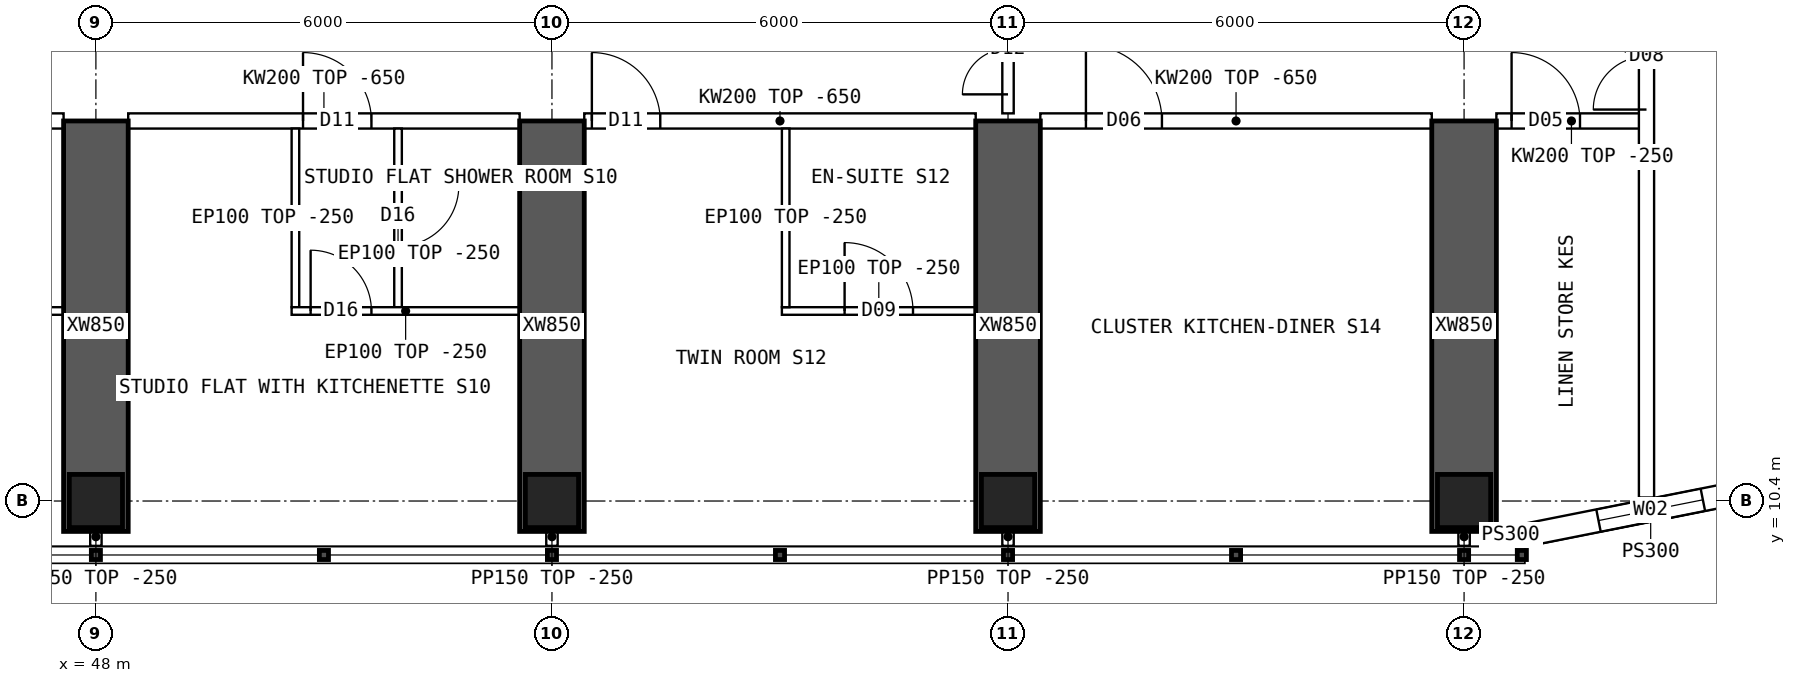
"""IFC4 building model, lengths in metres.
Left out: names, types, materials, properties, quantities, classifications, styles, units other than length and angle.
Written with IfcOpenShell. Run it as: python <this file> out.ifc"""

import sys

from ifc_helpers import new_model, si_unit, direction, frame, frame_2d, origin, origin_2d, place, context, subcontext, project, spatial, polyline, rectangle, hollow_rectangle, outline, extrude, element, fill, save


model = new_model("IFC4")
c1 = context("Model", 3, precision=1e-05, world=origin(), true_north=direction((0.0, 1.0)))
c2 = subcontext(c1, "Body", "Model", "MODEL_VIEW")
j1 = project(units=[si_unit("LENGTHUNIT", "METRE"), si_unit("PLANEANGLEUNIT", "RADIAN")], contexts=[c1])
p1 = place(None, origin())
s1 = spatial("IfcSite", under=j1, at=p1, CompositionType="ELEMENT")
p2 = place(p1, origin())
s2 = spatial("IfcBuilding", under=s1, at=p2, CompositionType="ELEMENT")
p3 = place(p2, frame((0.0, 0.0, 152.35)))
s3 = spatial("IfcBuildingStorey", under=s2, at=p3, CompositionType="ELEMENT", Elevation=152.35)
for number, where, z_axis, x_axis in (
    (1, (48.0, 10.4, 0.0), (0.0, 0.0, 1.0), (1.0, 0.0, 0.0)),
    (2, (54.0, 10.4, 0.0), (0.0, 0.0, 1.0), (1.0, 0.0, 0.0)),
    (3, (60.0, 10.4, 0.0), (0.0, 0.0, 1.0), (1.0, 0.0, 0.0)),
    (4, (66.0, 10.4, 0.0), (0.0, 0.0, 1.0), (1.0, 0.0, 0.0)),
):
    element("IfcColumn", number, at=place(p3, frame(where, z_axis=z_axis, x_axis=x_axis)), inside=s3, PredefinedType="COLUMN", context=c2, shape_type="SweptSolid", body=[
        extrude(hollow_rectangle(XDim=0.7, YDim=0.7, WallThickness=0.07, at=origin_2d()), origin(), (0.0, 0.0, 1.0), 3.75),
    ])
for number, where, z_axis, x_axis in (
    (5, (48.0, 10.0, 0.0), (0.0, 0.0, 1.0), (0.0, 1.0, 0.0)),
    (6, (54.0, 10.0, 0.0), (0.0, 0.0, 1.0), (0.0, 1.0, 0.0)),
    (7, (60.0, 10.0, 0.0), (0.0, 0.0, 1.0), (0.0, 1.0, 0.0)),
    (8, (66.0, 10.0, 0.0), (0.0, 0.0, 1.0), (0.0, 1.0, 0.0)),
):
    element("IfcWall", number, at=place(p3, frame(where, z_axis=z_axis, x_axis=x_axis)), inside=s3, PredefinedType="SHEAR", context=c2, shape_type="SweptSolid", body=[
        extrude(rectangle(XDim=5.4, YDim=0.85, at=frame_2d((2.7, 0.0))), origin(), (0.0, 0.0, 1.0), 3.75),
    ])
p4 = place(p3, frame((66.8, 9.95, 0.0), z_axis=(0.0, 0.0, 1.0), x_axis=(0.98078325777, 0.195100490205, 0.0)))
e9 = element("IfcWall", 9, at=p4, inside=s3, PredefinedType="SOLIDWALL", context=c2, shape_type="SweptSolid", body=[
    extrude(outline(polyline([(-0.03, -0.15), (3.405, -0.15), (3.345, 0.15), (0.03, 0.15), (-0.03, -0.15)])), origin(), (0.0, 0.0, 1.0), 3.5),
])
p5 = place(p4, frame((0.988, 0.0, 0.9)))
e10 = element("IfcOpeningElement", 10, at=p5, cuts=e9, PredefinedType="OPENING", context=c2, shape_type="SweptSolid", body=[
    extrude(rectangle(XDim=1.4, YDim=1.8, at=frame_2d((0.7, 0.9))), frame((0.0, 0.16, 0.0), z_axis=(0.0, -1.0, 0.0), x_axis=(1.0, 0.0, 0.0)), (0.0, 0.0, 1.0), 0.32),
])
p6 = place(p3, frame((66.8, 9.95, 0.0), z_axis=(0.0, 0.0, 1.0), x_axis=(-1.0, 0.0, 0.0)))
e11 = element("IfcWall", 11, at=p6, inside=s3, PredefinedType="SOLIDWALL", context=c2, shape_type="SweptSolid", body=[
    extrude(rectangle(XDim=0.375, YDim=0.3, at=frame_2d((0.188, 0.0))), origin(), (0.0, 0.0, 1.0), 3.5),
])
p7 = place(p3, frame((42.425, 15.4, 0.0), z_axis=(0.0, 0.0, 1.0), x_axis=(1.0, 0.0, 0.0)))
e12 = element("IfcWall", 12, at=p7, inside=s3, PredefinedType="SOLIDWALL", context=c2, shape_type="SweptSolid", body=[
    extrude(outline(polyline([(0.0, 0.0), (5.15, 0.0), (5.15, 3.1), (0.0, 3.1), (0.0, 0.0)])), frame((0.0, 0.1, 0.0), z_axis=(0.0, -1.0, 0.0), x_axis=(1.0, 0.0, 0.0)), (0.0, 0.0, 1.0), 0.2),
])
p8 = place(p7, frame((0.1, 0.0, 0.0)))
e13 = element("IfcOpeningElement", 13, at=p8, cuts=e12, PredefinedType="OPENING", context=c2, shape_type="SweptSolid", body=[
    extrude(rectangle(XDim=0.9, YDim=2.1, at=frame_2d((0.45, 1.05))), frame((0.0, 0.11, 0.0), z_axis=(0.0, -1.0, 0.0), x_axis=(1.0, 0.0, 0.0)), (0.0, 0.0, 1.0), 0.22),
])
p9 = place(p3, frame((48.425, 15.4, 0.0), z_axis=(0.0, 0.0, 1.0), x_axis=(1.0, 0.0, 0.0)))
e14 = element("IfcWall", 14, at=p9, inside=s3, PredefinedType="SOLIDWALL", context=c2, shape_type="SweptSolid", body=[
    extrude(outline(polyline([(0.0, 0.0), (5.15, 0.0), (5.15, 3.1), (0.0, 3.1), (0.0, 0.0)])), frame((0.0, 0.1, 0.0), z_axis=(0.0, -1.0, 0.0), x_axis=(1.0, 0.0, 0.0)), (0.0, 0.0, 1.0), 0.2),
])
p10 = place(p9, frame((2.3, 0.0, 0.0)))
e15 = element("IfcOpeningElement", 15, at=p10, cuts=e14, PredefinedType="OPENING", context=c2, shape_type="SweptSolid", body=[
    extrude(rectangle(XDim=0.9, YDim=2.1, at=frame_2d((0.45, 1.05))), frame((0.0, 0.11, 0.0), z_axis=(0.0, -1.0, 0.0), x_axis=(1.0, 0.0, 0.0)), (0.0, 0.0, 1.0), 0.22),
])
p11 = place(p3, frame((54.425, 15.4, 0.0), z_axis=(0.0, 0.0, 1.0), x_axis=(1.0, 0.0, 0.0)))
e16 = element("IfcWall", 16, at=p11, inside=s3, PredefinedType="SOLIDWALL", context=c2, shape_type="SweptSolid", body=[
    extrude(outline(polyline([(0.0, 0.0), (5.15, 0.0), (5.15, 3.1), (0.0, 3.1), (0.0, 0.0)])), frame((0.0, 0.1, 0.0), z_axis=(0.0, -1.0, 0.0), x_axis=(1.0, 0.0, 0.0)), (0.0, 0.0, 1.0), 0.2),
])
p12 = place(p11, frame((0.1, 0.0, 0.0)))
e17 = element("IfcOpeningElement", 17, at=p12, cuts=e16, PredefinedType="OPENING", context=c2, shape_type="SweptSolid", body=[
    extrude(rectangle(XDim=0.9, YDim=2.1, at=frame_2d((0.45, 1.05))), frame((0.0, 0.11, 0.0), z_axis=(0.0, -1.0, 0.0), x_axis=(1.0, 0.0, 0.0)), (0.0, 0.0, 1.0), 0.22),
])
p13 = place(p3, frame((60.425, 15.4, 0.0), z_axis=(0.0, 0.0, 1.0), x_axis=(1.0, 0.0, 0.0)))
e18 = element("IfcWall", 18, at=p13, inside=s3, PredefinedType="SOLIDWALL", context=c2, shape_type="SweptSolid", body=[
    extrude(outline(polyline([(0.0, 0.0), (5.15, 0.0), (5.15, 3.1), (0.0, 3.1), (0.0, 0.0)])), frame((0.0, 0.1, 0.0), z_axis=(0.0, -1.0, 0.0), x_axis=(1.0, 0.0, 0.0)), (0.0, 0.0, 1.0), 0.2),
])
p14 = place(p13, frame((0.6, 0.0, 0.0)))
e19 = element("IfcOpeningElement", 19, at=p14, cuts=e18, PredefinedType="OPENING", context=c2, shape_type="SweptSolid", body=[
    extrude(rectangle(XDim=1.0, YDim=2.1, at=frame_2d((0.5, 1.05))), frame((0.0, 0.11, 0.0), z_axis=(0.0, -1.0, 0.0), x_axis=(1.0, 0.0, 0.0)), (0.0, 0.0, 1.0), 0.22),
])
p15 = place(p3, frame((66.425, 15.4, 0.0), z_axis=(0.0, 0.0, 1.0), x_axis=(1.0, 0.0, 0.0)))
e20 = element("IfcWall", 20, at=p15, inside=s3, PredefinedType="SOLIDWALL", context=c2, shape_type="SweptSolid", body=[
    extrude(rectangle(XDim=1.975, YDim=0.2, at=frame_2d((0.987, 0.0))), origin(), (0.0, 0.0, 1.0), 3.5),
])
p16 = place(p15, frame((0.2, 0.0, 0.0)))
e21 = element("IfcOpeningElement", 21, at=p16, cuts=e20, PredefinedType="OPENING", context=c2, shape_type="SweptSolid", body=[
    extrude(rectangle(XDim=0.9, YDim=2.1, at=frame_2d((0.45, 1.05))), frame((0.0, 0.11, 0.0), z_axis=(0.0, -1.0, 0.0), x_axis=(1.0, 0.0, 0.0)), (0.0, 0.0, 1.0), 0.22),
])
p17 = place(p3, frame((47.575, 12.9, 0.0), z_axis=(0.0, 0.0, 1.0), x_axis=(-1.0, 0.0, 0.0)))
e22 = element("IfcWall", 22, at=p17, inside=s3, PredefinedType="PARTITIONING", context=c2, shape_type="SweptSolid", body=[
    extrude(rectangle(XDim=2.55, YDim=0.1, at=frame_2d((1.275, 0.0))), origin(), (0.0, 0.0, 1.0), 3.5),
])
p18 = place(p17, frame((0.825, 0.0, 0.0)))
e23 = element("IfcOpeningElement", 23, at=p18, cuts=e22, PredefinedType="OPENING", context=c2, shape_type="SweptSolid", body=[
    extrude(rectangle(XDim=0.9, YDim=2.1, at=frame_2d((0.45, 1.05))), frame((0.0, 0.06, 0.0), z_axis=(0.0, -1.0, 0.0), x_axis=(1.0, 0.0, 0.0)), (0.0, 0.0, 1.0), 0.12),
])
p19 = place(p3, frame((53.575, 12.9, 0.0), z_axis=(0.0, 0.0, 1.0), x_axis=(-1.0, 0.0, 0.0)))
e24 = element("IfcWall", 24, at=p19, inside=s3, PredefinedType="PARTITIONING", context=c2, shape_type="SweptSolid", body=[
    extrude(rectangle(XDim=3.0, YDim=0.1, at=frame_2d((1.5, 0.0))), origin(), (0.0, 0.0, 1.0), 3.5),
])
p20 = place(p19, frame((1.95, 0.0, 0.0)))
e25 = element("IfcOpeningElement", 25, at=p20, cuts=e24, PredefinedType="OPENING", context=c2, shape_type="SweptSolid", body=[
    extrude(rectangle(XDim=0.8, YDim=2.1, at=frame_2d((0.4, 1.05))), frame((0.0, 0.06, 0.0), z_axis=(0.0, -1.0, 0.0), x_axis=(1.0, 0.0, 0.0)), (0.0, 0.0, 1.0), 0.12),
])
p21 = place(p3, frame((50.625, 12.95, 0.0), z_axis=(0.0, 0.0, 1.0), x_axis=(0.0, 1.0, 0.0)))
e26 = element("IfcWall", 26, at=p21, inside=s3, PredefinedType="PARTITIONING", context=c2, shape_type="SweptSolid", body=[
    extrude(outline(polyline([(0.0, 0.0), (2.35, 0.0), (2.35, 3.1), (2.302, 3.1), (2.3, 3.5), (0.0, 3.5), (0.0, 0.0)])), frame((0.0, 0.05, 0.0), z_axis=(0.0, -1.0, 0.0), x_axis=(1.0, 0.0, 0.0)), (0.0, 0.0, 1.0), 0.1),
])
p22 = place(p3, frame((51.975, 12.95, 0.0), z_axis=(0.0, 0.0, 1.0), x_axis=(0.0, 1.0, 0.0)))
e27 = element("IfcWall", 27, at=p22, inside=s3, PredefinedType="PARTITIONING", context=c2, shape_type="SweptSolid", body=[
    extrude(outline(polyline([(0.0, 0.0), (2.35, 0.0), (2.35, 3.1), (2.302, 3.1), (2.3, 3.5), (0.0, 3.5), (0.0, 0.0)])), frame((0.0, 0.05, 0.0), z_axis=(0.0, -1.0, 0.0), x_axis=(1.0, 0.0, 0.0)), (0.0, 0.0, 1.0), 0.1),
])
p23 = place(p22, frame((0.8, 0.0, 0.0)))
e28 = element("IfcOpeningElement", 28, at=p23, cuts=e27, PredefinedType="OPENING", context=c2, shape_type="SweptSolid", body=[
    extrude(rectangle(XDim=0.8, YDim=2.1, at=frame_2d((0.4, 1.05))), frame((0.0, 0.06, 0.0), z_axis=(0.0, -1.0, 0.0), x_axis=(1.0, 0.0, 0.0)), (0.0, 0.0, 1.0), 0.12),
])
p24 = place(p3, frame((59.575, 12.9, 0.0), z_axis=(0.0, 0.0, 1.0), x_axis=(-1.0, 0.0, 0.0)))
e29 = element("IfcWall", 29, at=p24, inside=s3, PredefinedType="PARTITIONING", context=c2, shape_type="SweptSolid", body=[
    extrude(rectangle(XDim=2.55, YDim=0.1, at=frame_2d((1.275, 0.0))), origin(), (0.0, 0.0, 1.0), 3.5),
])
p25 = place(p24, frame((0.825, 0.0, 0.0)))
e30 = element("IfcOpeningElement", 30, at=p25, cuts=e29, PredefinedType="OPENING", context=c2, shape_type="SweptSolid", body=[
    extrude(rectangle(XDim=0.9, YDim=2.1, at=frame_2d((0.45, 1.05))), frame((0.0, 0.06, 0.0), z_axis=(0.0, -1.0, 0.0), x_axis=(1.0, 0.0, 0.0)), (0.0, 0.0, 1.0), 0.12),
])
p26 = place(p3, frame((57.075, 12.95, 0.0), z_axis=(0.0, 0.0, 1.0), x_axis=(0.0, 1.0, 0.0)))
e31 = element("IfcWall", 31, at=p26, inside=s3, PredefinedType="PARTITIONING", context=c2, shape_type="SweptSolid", body=[
    extrude(outline(polyline([(0.0, 0.0), (2.35, 0.0), (2.35, 3.1), (2.302, 3.1), (2.3, 3.5), (0.0, 3.5), (0.0, 0.0)])), frame((0.0, 0.05, 0.0), z_axis=(0.0, -1.0, 0.0), x_axis=(1.0, 0.0, 0.0)), (0.0, 0.0, 1.0), 0.1),
])
p27 = place(p3, frame((60.0, 15.5, 0.0), z_axis=(0.0, 0.0, 1.0), x_axis=(0.0, 1.0, 0.0)))
e32 = element("IfcWall", 32, at=p27, inside=s3, PredefinedType="PARTITIONING", context=c2, shape_type="SweptSolid", body=[
    extrude(outline(polyline([(0.0, 0.0), (1.7, 0.0), (1.7, 3.1), (0.0, 3.1), (0.0, 0.0)])), frame((0.0, 0.075, 0.0), z_axis=(0.0, -1.0, 0.0), x_axis=(1.0, 0.0, 0.0)), (0.0, 0.0, 1.0), 0.15),
])
p28 = place(p27, frame((0.25, 0.0, 0.0)))
e33 = element("IfcOpeningElement", 33, at=p28, cuts=e32, PredefinedType="OPENING", context=c2, shape_type="SweptSolid", body=[
    extrude(rectangle(XDim=1.2, YDim=2.1, at=frame_2d((0.6, 1.05))), frame((0.0, 0.085, 0.0), z_axis=(0.0, -1.0, 0.0), x_axis=(1.0, 0.0, 0.0)), (0.0, 0.0, 1.0), 0.17),
])
p29 = place(p3, frame((68.4, 10.446, 0.0), z_axis=(0.0, 0.0, 1.0), x_axis=(0.0, 1.0, 0.0)))
e34 = element("IfcWall", 34, at=p29, inside=s3, PredefinedType="SOLIDWALL", context=c2, shape_type="SweptSolid", body=[
    extrude(rectangle(XDim=43.107, YDim=0.2, at=frame_2d((21.554, 0.0))), origin(), (0.0, 0.0, 1.0), 3.5),
])
p30 = place(p29, frame((27.994, 0.0, 0.0)))
e35 = element("IfcOpeningElement", 35, at=p30, cuts=e34, PredefinedType="OPENING", context=c2, shape_type="SweptSolid", body=[
    extrude(rectangle(XDim=1.2, YDim=2.1, at=frame_2d((0.6, 1.05))), frame((0.0, 0.11, 0.0), z_axis=(0.0, -1.0, 0.0), x_axis=(1.0, 0.0, 0.0)), (0.0, 0.0, 1.0), 0.22),
])
p31 = place(p29, frame((5.104, 0.0, 0.0)))
e36 = element("IfcOpeningElement", 36, at=p31, cuts=e34, PredefinedType="OPENING", context=c2, shape_type="SweptSolid", body=[
    extrude(rectangle(XDim=1.4, YDim=2.1, at=frame_2d((0.7, 1.05))), frame((0.0, 0.11, 0.0), z_axis=(0.0, -1.0, 0.0), x_axis=(1.0, 0.0, 0.0)), (0.0, 0.0, 1.0), 0.22),
])
p32 = place(p29, frame((36.504, 0.0, 0.0)))
e37 = element("IfcOpeningElement", 37, at=p32, cuts=e34, PredefinedType="OPENING", context=c2, shape_type="SweptSolid", body=[
    extrude(rectangle(XDim=1.4, YDim=2.1, at=frame_2d((0.7, 1.05))), frame((0.0, 0.11, 0.0), z_axis=(0.0, -1.0, 0.0), x_axis=(1.0, 0.0, 0.0)), (0.0, 0.0, 1.0), 0.22),
])
for number, where, z_axis, x_axis in (
    (38, (48.0, 10.05, 0.0), (0.0, 0.0, 1.0), (0.0, -1.0, 0.0)),
    (39, (54.0, 10.05, 0.0), (0.0, 0.0, 1.0), (0.0, -1.0, 0.0)),
    (40, (60.0, 10.05, 0.0), (0.0, 0.0, 1.0), (0.0, -1.0, 0.0)),
    (41, (66.0, 10.05, 0.0), (0.0, 0.0, 1.0), (0.0, -1.0, 0.0)),
):
    element("IfcWall", number, at=place(p3, frame(where, z_axis=z_axis, x_axis=x_axis)), inside=s3, PredefinedType="PARTITIONING", context=c2, shape_type="SweptSolid", body=[
        extrude(rectangle(XDim=0.24, YDim=0.15, at=frame_2d((0.12, 0.0))), origin(), (0.0, 0.0, 1.0), 3.5),
    ])
p33 = place(p5, origin())
e42 = element("IfcWindow", 42, at=p33, inside=s3, PartitioningType="SINGLE_PANEL", PredefinedType="WINDOW", context=c2, shape_type="SweptSolid", body=[
    extrude(rectangle(XDim=1.4, YDim=1.8, at=frame_2d((0.7, 0.9))), frame((0.0, 0.03, 0.0), z_axis=(0.0, -1.0, 0.0), x_axis=(1.0, 0.0, 0.0)), (0.0, 0.0, 1.0), 0.06),
])
fill(e10, e42)
p34 = place(p20, origin())
e43 = element("IfcDoor", 43, at=p34, inside=s3, OperationType="SINGLE_SWING_RIGHT", PredefinedType="DOOR", context=c2, shape_type="SweptSolid", body=[
    extrude(rectangle(XDim=0.8, YDim=2.1, at=frame_2d((0.4, 1.05))), frame((0.0, 0.025, 0.0), z_axis=(0.0, -1.0, 0.0), x_axis=(1.0, 0.0, 0.0)), (0.0, 0.0, 1.0), 0.05),
])
fill(e25, e43)
p35 = place(p23, origin())
e44 = element("IfcDoor", 44, at=p35, inside=s3, OperationType="SINGLE_SWING_RIGHT", PredefinedType="DOOR", context=c2, shape_type="SweptSolid", body=[
    extrude(rectangle(XDim=0.8, YDim=2.1, at=frame_2d((0.4, 1.05))), frame((0.0, 0.025, 0.0), z_axis=(0.0, -1.0, 0.0), x_axis=(1.0, 0.0, 0.0)), (0.0, 0.0, 1.0), 0.05),
])
fill(e28, e44)
p36 = place(p10, origin())
e45 = element("IfcDoor", 45, at=p36, inside=s3, OperationType="SINGLE_SWING_LEFT", PredefinedType="DOOR", context=c2, shape_type="SweptSolid", body=[
    extrude(rectangle(XDim=0.9, YDim=2.1, at=frame_2d((0.45, 1.05))), frame((0.0, 0.025, 0.0), z_axis=(0.0, -1.0, 0.0), x_axis=(1.0, 0.0, 0.0)), (0.0, 0.0, 1.0), 0.05),
])
fill(e15, e45)
p37 = place(p25, origin())
e46 = element("IfcDoor", 46, at=p37, inside=s3, OperationType="SINGLE_SWING_RIGHT", PredefinedType="DOOR", context=c2, shape_type="SweptSolid", body=[
    extrude(rectangle(XDim=0.9, YDim=2.1, at=frame_2d((0.45, 1.05))), frame((0.0, 0.025, 0.0), z_axis=(0.0, -1.0, 0.0), x_axis=(1.0, 0.0, 0.0)), (0.0, 0.0, 1.0), 0.05),
])
fill(e30, e46)
p38 = place(p12, origin())
e47 = element("IfcDoor", 47, at=p38, inside=s3, OperationType="SINGLE_SWING_LEFT", PredefinedType="DOOR", context=c2, shape_type="SweptSolid", body=[
    extrude(rectangle(XDim=0.9, YDim=2.1, at=frame_2d((0.45, 1.05))), frame((0.0, 0.025, 0.0), z_axis=(0.0, -1.0, 0.0), x_axis=(1.0, 0.0, 0.0)), (0.0, 0.0, 1.0), 0.05),
])
fill(e17, e47)
p39 = place(p14, origin())
e48 = element("IfcDoor", 48, at=p39, inside=s3, OperationType="SINGLE_SWING_LEFT", PredefinedType="DOOR", context=c2, shape_type="SweptSolid", body=[
    extrude(rectangle(XDim=1.0, YDim=2.1, at=frame_2d((0.5, 1.05))), frame((0.0, 0.025, 0.0), z_axis=(0.0, -1.0, 0.0), x_axis=(1.0, 0.0, 0.0)), (0.0, 0.0, 1.0), 0.05),
])
fill(e19, e48)
p40 = place(p28, origin())
e49 = element("IfcDoor", 49, at=p40, inside=s3, OperationType="DOUBLE_DOOR_SINGLE_SWING", PredefinedType="DOOR", context=c2, shape_type="SweptSolid", body=[
    extrude(rectangle(XDim=1.2, YDim=2.1, at=frame_2d((0.6, 1.05))), frame((0.0, 0.025, 0.0), z_axis=(0.0, -1.0, 0.0), x_axis=(1.0, 0.0, 0.0)), (0.0, 0.0, 1.0), 0.05),
])
fill(e33, e49)
p41 = place(p31, origin())
e50 = element("IfcDoor", 50, at=p41, inside=s3, OperationType="DOUBLE_DOOR_SINGLE_SWING", PredefinedType="DOOR", context=c2, shape_type="SweptSolid", body=[
    extrude(rectangle(XDim=1.4, YDim=2.1, at=frame_2d((0.7, 1.05))), frame((0.0, 0.025, 0.0), z_axis=(0.0, -1.0, 0.0), x_axis=(1.0, 0.0, 0.0)), (0.0, 0.0, 1.0), 0.05),
])
fill(e36, e50)
p42 = place(p16, origin())
e51 = element("IfcDoor", 51, at=p42, inside=s3, OperationType="SINGLE_SWING_LEFT", PredefinedType="DOOR", context=c2, shape_type="SweptSolid", body=[
    extrude(rectangle(XDim=0.9, YDim=2.1, at=frame_2d((0.45, 1.05))), frame((0.0, 0.025, 0.0), z_axis=(0.0, -1.0, 0.0), x_axis=(1.0, 0.0, 0.0)), (0.0, 0.0, 1.0), 0.05),
])
fill(e21, e51)
save(model, sys.argv[1])
